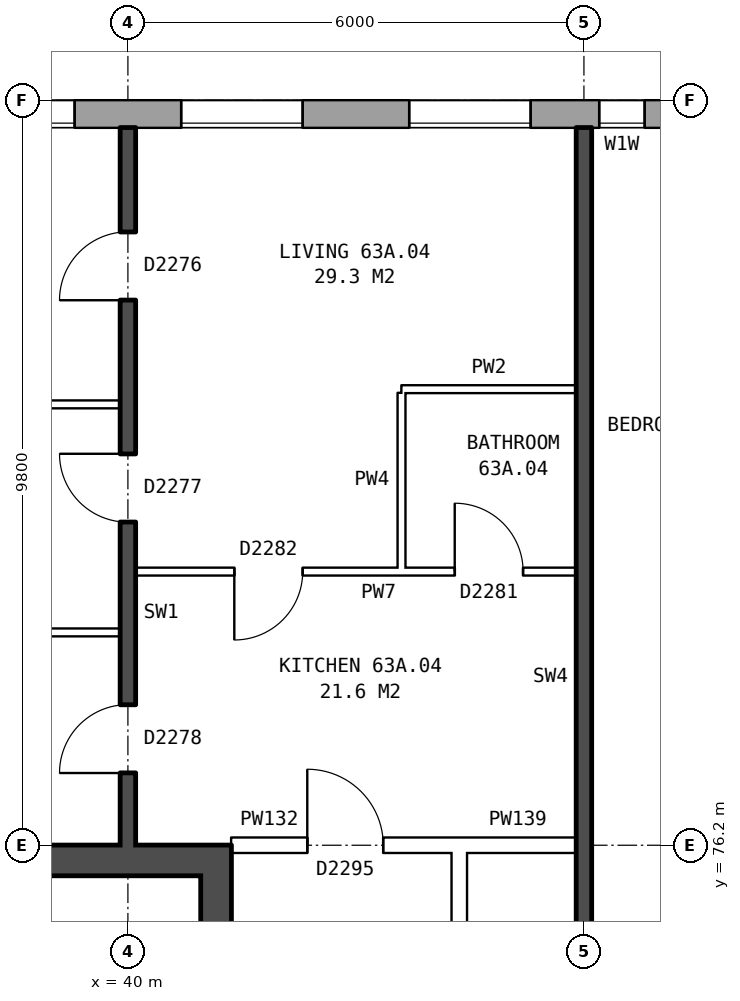
"""IFC4 building model, lengths in metres.
Left out: names, types, materials, properties, quantities, classifications, styles, units other than length and angle.
Written with IfcOpenShell. Run it as: python <this file> out.ifc"""

import sys

from ifc_helpers import new_model, si_unit, direction, frame, frame_2d, origin, place, context, subcontext, project, spatial, rectangle, extrude, element, fill, save


model = new_model("IFC4")
c1 = context("Model", 3, precision=1e-05, world=origin(), true_north=direction((0.0, 1.0)))
c2 = subcontext(c1, "Body", "Model", "MODEL_VIEW")
j1 = project(units=[si_unit("LENGTHUNIT", "METRE"), si_unit("PLANEANGLEUNIT", "RADIAN")], contexts=[c1])
p1 = place(None, origin())
s1 = spatial("IfcSite", under=j1, at=p1, CompositionType="ELEMENT")
p2 = place(p1, origin())
s2 = spatial("IfcBuilding", under=s1, at=p2, CompositionType="ELEMENT")
p3 = place(p2, frame((0.0, 0.0, 224.5)))
s3 = spatial("IfcBuildingStorey", under=s2, at=p3, CompositionType="ELEMENT", Elevation=224.5)
p4 = place(p3, frame((74.95, 85.82, 0.0), z_axis=(0.0, 0.0, 1.0), x_axis=(-1.0, 0.0, 0.0)))
e1 = element("IfcWall", 1, at=p4, inside=s3, PredefinedType="STANDARD", context=c2, shape_type="SweptSolid", body=[
    extrude(rectangle(XDim=39.875, YDim=0.36, at=frame_2d((19.938, 0.0))), origin(), (0.0, 0.0, 1.0), 2.85),
])
p5 = place(p4, frame((2.65, 0.0, 0.8)))
e2 = element("IfcOpeningElement", 2, at=p5, cuts=e1, PredefinedType="OPENING", context=c2, shape_type="SweptSolid", body=[
    extrude(rectangle(XDim=1.6, YDim=1.8, at=frame_2d((0.8, 0.9))), frame((0.0, 0.19, 0.0), z_axis=(0.0, -1.0, 0.0), x_axis=(1.0, 0.0, 0.0)), (0.0, 0.0, 1.0), 0.38),
])
p6 = place(p4, frame((5.65, 0.0, 0.8)))
e3 = element("IfcOpeningElement", 3, at=p6, cuts=e1, PredefinedType="OPENING", context=c2, shape_type="SweptSolid", body=[
    extrude(rectangle(XDim=1.6, YDim=1.8, at=frame_2d((0.8, 0.9))), frame((0.0, 0.19, 0.0), z_axis=(0.0, -1.0, 0.0), x_axis=(1.0, 0.0, 0.0)), (0.0, 0.0, 1.0), 0.38),
])
p7 = place(p4, frame((8.65, 0.0, 0.8)))
e4 = element("IfcOpeningElement", 4, at=p7, cuts=e1, PredefinedType="OPENING", context=c2, shape_type="SweptSolid", body=[
    extrude(rectangle(XDim=1.6, YDim=1.8, at=frame_2d((0.8, 0.9))), frame((0.0, 0.19, 0.0), z_axis=(0.0, -1.0, 0.0), x_axis=(1.0, 0.0, 0.0)), (0.0, 0.0, 1.0), 0.38),
])
p8 = place(p4, frame((11.65, 0.0, 0.8)))
e5 = element("IfcOpeningElement", 5, at=p8, cuts=e1, PredefinedType="OPENING", context=c2, shape_type="SweptSolid", body=[
    extrude(rectangle(XDim=1.6, YDim=1.8, at=frame_2d((0.8, 0.9))), frame((0.0, 0.19, 0.0), z_axis=(0.0, -1.0, 0.0), x_axis=(1.0, 0.0, 0.0)), (0.0, 0.0, 1.0), 0.38),
])
p9 = place(p4, frame((15.55, 0.0, 0.8)))
e6 = element("IfcOpeningElement", 6, at=p9, cuts=e1, PredefinedType="OPENING", context=c2, shape_type="SweptSolid", body=[
    extrude(rectangle(XDim=1.2, YDim=1.8, at=frame_2d((0.6, 0.9))), frame((0.0, 0.19, 0.0), z_axis=(0.0, -1.0, 0.0), x_axis=(1.0, 0.0, 0.0)), (0.0, 0.0, 1.0), 0.38),
])
p10 = place(p4, frame((17.65, 0.0, 0.8)))
e7 = element("IfcOpeningElement", 7, at=p10, cuts=e1, PredefinedType="OPENING", context=c2, shape_type="SweptSolid", body=[
    extrude(rectangle(XDim=1.6, YDim=1.8, at=frame_2d((0.8, 0.9))), frame((0.0, 0.19, 0.0), z_axis=(0.0, -1.0, 0.0), x_axis=(1.0, 0.0, 0.0)), (0.0, 0.0, 1.0), 0.38),
])
p11 = place(p4, frame((20.65, 0.0, 0.8)))
e8 = element("IfcOpeningElement", 8, at=p11, cuts=e1, PredefinedType="OPENING", context=c2, shape_type="SweptSolid", body=[
    extrude(rectangle(XDim=1.6, YDim=1.8, at=frame_2d((0.8, 0.9))), frame((0.0, 0.19, 0.0), z_axis=(0.0, -1.0, 0.0), x_axis=(1.0, 0.0, 0.0)), (0.0, 0.0, 1.0), 0.38),
])
p12 = place(p4, frame((23.65, 0.0, 0.8)))
e9 = element("IfcOpeningElement", 9, at=p12, cuts=e1, PredefinedType="OPENING", context=c2, shape_type="SweptSolid", body=[
    extrude(rectangle(XDim=1.6, YDim=1.8, at=frame_2d((0.8, 0.9))), frame((0.0, 0.19, 0.0), z_axis=(0.0, -1.0, 0.0), x_axis=(1.0, 0.0, 0.0)), (0.0, 0.0, 1.0), 0.38),
])
p13 = place(p4, frame((26.1, 0.0, 0.25)))
e10 = element("IfcOpeningElement", 10, at=p13, cuts=e1, PredefinedType="OPENING", context=c2, shape_type="SweptSolid", body=[
    extrude(rectangle(XDim=0.8, YDim=1.5, at=frame_2d((0.4, 0.75))), frame((0.0, 0.19, 0.0), z_axis=(0.0, -1.0, 0.0), x_axis=(1.0, 0.0, 0.0)), (0.0, 0.0, 1.0), 0.38),
])
p14 = place(p4, frame((29.65, 0.0, 0.8)))
e11 = element("IfcOpeningElement", 11, at=p14, cuts=e1, PredefinedType="OPENING", context=c2, shape_type="SweptSolid", body=[
    extrude(rectangle(XDim=1.6, YDim=1.8, at=frame_2d((0.8, 0.9))), frame((0.0, 0.19, 0.0), z_axis=(0.0, -1.0, 0.0), x_axis=(1.0, 0.0, 0.0)), (0.0, 0.0, 1.0), 0.38),
])
p15 = place(p4, frame((32.65, 0.0, 0.8)))
e12 = element("IfcOpeningElement", 12, at=p15, cuts=e1, PredefinedType="OPENING", context=c2, shape_type="SweptSolid", body=[
    extrude(rectangle(XDim=1.6, YDim=1.8, at=frame_2d((0.8, 0.9))), frame((0.0, 0.19, 0.0), z_axis=(0.0, -1.0, 0.0), x_axis=(1.0, 0.0, 0.0)), (0.0, 0.0, 1.0), 0.38),
])
p16 = place(p4, frame((35.65, 0.0, 0.8)))
e13 = element("IfcOpeningElement", 13, at=p16, cuts=e1, PredefinedType="OPENING", context=c2, shape_type="SweptSolid", body=[
    extrude(rectangle(XDim=1.6, YDim=1.8, at=frame_2d((0.8, 0.9))), frame((0.0, 0.19, 0.0), z_axis=(0.0, -1.0, 0.0), x_axis=(1.0, 0.0, 0.0)), (0.0, 0.0, 1.0), 0.38),
])
p17 = place(p4, frame((28.15, 0.0, 1.65)))
e14 = element("IfcOpeningElement", 14, at=p17, cuts=e1, PredefinedType="OPENING", context=c2, shape_type="SweptSolid", body=[
    extrude(rectangle(XDim=0.6, YDim=0.9, at=frame_2d((0.3, 0.45))), frame((0.0, 0.19, 0.0), z_axis=(0.0, -1.0, 0.0), x_axis=(1.0, 0.0, 0.0)), (0.0, 0.0, 1.0), 0.38),
])
p18 = place(p3, frame((41.16, 76.2, 0.0), z_axis=(0.0, 0.0, 1.0), x_axis=(0.0, -1.0, 0.0)))
e15 = element("IfcWall", 15, at=p18, inside=s3, PredefinedType="SHEAR", context=c2, shape_type="SweptSolid", body=[
    extrude(rectangle(XDim=12.4, YDim=0.4, at=frame_2d((6.2, 0.0))), origin(), (0.0, 0.0, 1.0), 2.85),
])
p19 = place(p18, frame((1.325, 0.0, 0.0)))
e16 = element("IfcOpeningElement", 16, at=p19, cuts=e15, PredefinedType="OPENING", context=c2, shape_type="SweptSolid", body=[
    extrude(rectangle(XDim=1.1, YDim=2.1, at=frame_2d((0.55, 1.05))), frame((0.0, 0.21, 0.0), z_axis=(0.0, -1.0, 0.0), x_axis=(1.0, 0.0, 0.0)), (0.0, 0.0, 1.0), 0.42),
])
p20 = place(p18, frame((5.925, 0.0, 0.0)))
e17 = element("IfcOpeningElement", 17, at=p20, cuts=e15, PredefinedType="OPENING", context=c2, shape_type="SweptSolid", body=[
    extrude(rectangle(XDim=0.85, YDim=2.1, at=frame_2d((0.425, 1.05))), frame((0.0, 0.21, 0.0), z_axis=(0.0, -1.0, 0.0), x_axis=(1.0, 0.0, 0.0)), (0.0, 0.0, 1.0), 0.42),
])
p21 = place(p18, frame((9.9, 0.0, 0.0)))
e18 = element("IfcOpeningElement", 18, at=p21, cuts=e15, PredefinedType="OPENING", context=c2, shape_type="SweptSolid", body=[
    extrude(rectangle(XDim=1.1, YDim=2.1, at=frame_2d((0.55, 1.05))), frame((0.0, 0.21, 0.0), z_axis=(0.0, -1.0, 0.0), x_axis=(1.0, 0.0, 0.0)), (0.0, 0.0, 1.0), 0.42),
])
p22 = place(p3, frame((40.96, 76.0, 0.0), z_axis=(0.0, 0.0, 1.0), x_axis=(-1.0, 0.0, 0.0)))
e19 = element("IfcWall", 19, at=p22, inside=s3, PredefinedType="SHEAR", context=c2, shape_type="SweptSolid", body=[
    extrude(rectangle(XDim=8.2, YDim=0.4, at=frame_2d((4.1, 0.0))), origin(), (0.0, 0.0, 1.0), 2.85),
])
p23 = place(p3, frame((44.36, 63.9, 0.0), z_axis=(0.0, 0.0, 1.0), x_axis=(0.0, 1.0, 0.0)))
e20 = element("IfcWall", 20, at=p23, inside=s3, PredefinedType="PARTITIONING", context=c2, shape_type="SweptSolid", body=[
    extrude(rectangle(XDim=12.2, YDim=0.2, at=frame_2d((6.1, 0.0))), origin(), (0.0, 0.0, 1.0), 2.85),
])
p24 = place(p23, frame((5.1, 0.0, 0.0)))
e21 = element("IfcOpeningElement", 21, at=p24, cuts=e20, PredefinedType="OPENING", context=c2, shape_type="SweptSolid", body=[
    extrude(rectangle(XDim=2.0, YDim=2.1, at=frame_2d((1.0, 1.05))), frame((0.0, 0.11, 0.0), z_axis=(0.0, -1.0, 0.0), x_axis=(1.0, 0.0, 0.0)), (0.0, 0.0, 1.0), 0.22),
])
p25 = place(p3, frame((41.36, 76.2, 0.0), z_axis=(0.0, 0.0, 1.0), x_axis=(1.0, 0.0, 0.0)))
e22 = element("IfcWall", 22, at=p25, inside=s3, PredefinedType="PARTITIONING", context=c2, shape_type="SweptSolid", body=[
    extrude(rectangle(XDim=3.0, YDim=0.2, at=frame_2d((1.5, 0.0))), origin(), (0.0, 0.0, 1.0), 2.85),
])
p26 = place(p25, frame((1.0, 0.0, 0.0)))
e23 = element("IfcOpeningElement", 23, at=p26, cuts=e22, PredefinedType="OPENING", context=c2, shape_type="SweptSolid", body=[
    extrude(rectangle(XDim=1.0, YDim=2.1, at=frame_2d((0.5, 1.05))), frame((0.0, 0.11, 0.0), z_axis=(0.0, -1.0, 0.0), x_axis=(1.0, 0.0, 0.0)), (0.0, 0.0, 1.0), 0.22),
])
p27 = place(p3, frame((44.36, 76.2, 0.0), z_axis=(0.0, 0.0, 1.0), x_axis=(1.0, 0.0, 0.0)))
e24 = element("IfcWall", 24, at=p27, inside=s3, PredefinedType="PARTITIONING", context=c2, shape_type="SweptSolid", body=[
    extrude(rectangle(XDim=1.54, YDim=0.2, at=frame_2d((0.77, 0.0))), origin(), (0.0, 0.0, 1.0), 2.85),
])
p28 = place(p3, frame((32.36, 79.0, 0.0), z_axis=(0.0, 0.0, 1.0), x_axis=(1.0, 0.0, 0.0)))
e25 = element("IfcWall", 25, at=p28, inside=s3, PredefinedType="PARTITIONING", context=c2, shape_type="SweptSolid", body=[
    extrude(rectangle(XDim=7.54, YDim=0.1, at=frame_2d((3.77, 0.0))), origin(), (0.0, 0.0, 1.0), 2.85),
])
p29 = place(p3, frame((40.1, 79.8, 0.0), z_axis=(0.0, 0.0, 1.0), x_axis=(1.0, 0.0, 0.0)))
e26 = element("IfcWall", 26, at=p29, inside=s3, PredefinedType="PARTITIONING", context=c2, shape_type="SweptSolid", body=[
    extrude(rectangle(XDim=5.8, YDim=0.1, at=frame_2d((2.9, 0.0))), origin(), (0.0, 0.0, 1.0), 2.85),
])
p30 = place(p29, frame((1.3, 0.0, 0.0)))
e27 = element("IfcOpeningElement", 27, at=p30, cuts=e26, PredefinedType="OPENING", context=c2, shape_type="SweptSolid", body=[
    extrude(rectangle(XDim=0.9, YDim=2.1, at=frame_2d((0.45, 1.05))), frame((0.0, 0.06, 0.0), z_axis=(0.0, -1.0, 0.0), x_axis=(1.0, 0.0, 0.0)), (0.0, 0.0, 1.0), 0.12),
])
p31 = place(p29, frame((4.2, 0.0, 0.0)))
e28 = element("IfcOpeningElement", 28, at=p31, cuts=e26, PredefinedType="OPENING", context=c2, shape_type="SweptSolid", body=[
    extrude(rectangle(XDim=0.9, YDim=2.1, at=frame_2d((0.45, 1.05))), frame((0.0, 0.06, 0.0), z_axis=(0.0, -1.0, 0.0), x_axis=(1.0, 0.0, 0.0)), (0.0, 0.0, 1.0), 0.12),
])
p32 = place(p3, frame((32.36, 82.0, 0.0), z_axis=(0.0, 0.0, 1.0), x_axis=(1.0, 0.0, 0.0)))
e29 = element("IfcWall", 29, at=p32, inside=s3, PredefinedType="PARTITIONING", context=c2, shape_type="SweptSolid", body=[
    extrude(rectangle(XDim=7.54, YDim=0.1, at=frame_2d((3.77, 0.0))), origin(), (0.0, 0.0, 1.0), 2.85),
])
p33 = place(p3, frame((43.6, 82.2, 0.0), z_axis=(0.0, 0.0, 1.0), x_axis=(1.0, 0.0, 0.0)))
e30 = element("IfcWall", 30, at=p33, inside=s3, PredefinedType="PARTITIONING", context=c2, shape_type="SweptSolid", body=[
    extrude(rectangle(XDim=2.3, YDim=0.1, at=frame_2d((1.15, 0.0))), origin(), (0.0, 0.0, 1.0), 2.85),
])
p34 = place(p3, frame((40.0, 76.2, 0.0), z_axis=(0.0, 0.0, 1.0), x_axis=(0.0, 1.0, 0.0)))
e31 = element("IfcWall", 31, at=p34, inside=s3, PredefinedType="SOLIDWALL", context=c2, shape_type="SweptSolid", body=[
    extrude(rectangle(XDim=9.44, YDim=0.2, at=frame_2d((4.72, 0.0))), origin(), (0.0, 0.0, 1.0), 2.85),
])
p35 = place(p34, frame((7.17, 0.0, 0.0)))
e32 = element("IfcOpeningElement", 32, at=p35, cuts=e31, PredefinedType="OPENING", context=c2, shape_type="SweptSolid", body=[
    extrude(rectangle(XDim=0.9, YDim=2.1, at=frame_2d((0.45, 1.05))), frame((0.0, 0.11, 0.0), z_axis=(0.0, -1.0, 0.0), x_axis=(1.0, 0.0, 0.0)), (0.0, 0.0, 1.0), 0.22),
])
p36 = place(p34, frame((4.25, 0.0, 0.0)))
e33 = element("IfcOpeningElement", 33, at=p36, cuts=e31, PredefinedType="OPENING", context=c2, shape_type="SweptSolid", body=[
    extrude(rectangle(XDim=0.9, YDim=2.1, at=frame_2d((0.45, 1.05))), frame((0.0, 0.11, 0.0), z_axis=(0.0, -1.0, 0.0), x_axis=(1.0, 0.0, 0.0)), (0.0, 0.0, 1.0), 0.22),
])
p37 = place(p34, frame((0.95, 0.0, 0.0)))
e34 = element("IfcOpeningElement", 34, at=p37, cuts=e31, PredefinedType="OPENING", context=c2, shape_type="SweptSolid", body=[
    extrude(rectangle(XDim=0.9, YDim=2.1, at=frame_2d((0.45, 1.05))), frame((0.0, 0.11, 0.0), z_axis=(0.0, -1.0, 0.0), x_axis=(1.0, 0.0, 0.0)), (0.0, 0.0, 1.0), 0.22),
])
p38 = place(p3, frame((43.6, 79.85, 0.0), z_axis=(0.0, 0.0, 1.0), x_axis=(0.0, 1.0, 0.0)))
e35 = element("IfcWall", 35, at=p38, inside=s3, PredefinedType="PARTITIONING", context=c2, shape_type="SweptSolid", body=[
    extrude(rectangle(XDim=2.3, YDim=0.1, at=frame_2d((1.15, 0.0))), origin(), (0.0, 0.0, 1.0), 2.85),
])
p39 = place(p3, frame((46.0, 71.2, 0.0), z_axis=(0.0, 0.0, 1.0), x_axis=(0.0, 1.0, 0.0)))
e36 = element("IfcWall", 36, at=p39, inside=s3, PredefinedType="SOLIDWALL", context=c2, shape_type="SweptSolid", body=[
    extrude(rectangle(XDim=14.44, YDim=0.2, at=frame_2d((7.22, 0.0))), origin(), (0.0, 0.0, 1.0), 2.85),
])
p40 = place(p14, origin())
e37 = element("IfcWindow", 37, at=p40, inside=s3, PartitioningType="SINGLE_PANEL", PredefinedType="WINDOW", context=c2, shape_type="SweptSolid", body=[
    extrude(rectangle(XDim=1.6, YDim=1.8, at=frame_2d((0.8, 0.9))), frame((0.0, 0.15, 0.0), z_axis=(0.0, -1.0, 0.0), x_axis=(1.0, 0.0, 0.0)), (0.0, 0.0, 1.0), 0.06),
])
fill(e11, e37)
p41 = place(p15, origin())
e38 = element("IfcWindow", 38, at=p41, inside=s3, PartitioningType="SINGLE_PANEL", PredefinedType="WINDOW", context=c2, shape_type="SweptSolid", body=[
    extrude(rectangle(XDim=1.6, YDim=1.8, at=frame_2d((0.8, 0.9))), frame((0.0, 0.15, 0.0), z_axis=(0.0, -1.0, 0.0), x_axis=(1.0, 0.0, 0.0)), (0.0, 0.0, 1.0), 0.06),
])
fill(e12, e38)
p42 = place(p16, origin())
e39 = element("IfcWindow", 39, at=p42, inside=s3, PartitioningType="SINGLE_PANEL", PredefinedType="WINDOW", context=c2, shape_type="SweptSolid", body=[
    extrude(rectangle(XDim=1.6, YDim=1.8, at=frame_2d((0.8, 0.9))), frame((0.0, 0.15, 0.0), z_axis=(0.0, -1.0, 0.0), x_axis=(1.0, 0.0, 0.0)), (0.0, 0.0, 1.0), 0.06),
])
fill(e13, e39)
p43 = place(p35, origin())
e40 = element("IfcDoor", 40, at=p43, inside=s3, OperationType="SINGLE_SWING_LEFT", PredefinedType="DOOR", context=c2, shape_type="SweptSolid", body=[
    extrude(rectangle(XDim=0.9, YDim=2.1, at=frame_2d((0.45, 1.05))), frame((0.0, 0.025, 0.0), z_axis=(0.0, -1.0, 0.0), x_axis=(1.0, 0.0, 0.0)), (0.0, 0.0, 1.0), 0.05),
])
fill(e32, e40)
p44 = place(p36, origin())
e41 = element("IfcDoor", 41, at=p44, inside=s3, OperationType="SINGLE_SWING_RIGHT", PredefinedType="DOOR", context=c2, shape_type="SweptSolid", body=[
    extrude(rectangle(XDim=0.9, YDim=2.1, at=frame_2d((0.45, 1.05))), frame((0.0, 0.025, 0.0), z_axis=(0.0, -1.0, 0.0), x_axis=(1.0, 0.0, 0.0)), (0.0, 0.0, 1.0), 0.05),
])
fill(e33, e41)
p45 = place(p37, origin())
e42 = element("IfcDoor", 42, at=p45, inside=s3, OperationType="SINGLE_SWING_LEFT", PredefinedType="DOOR", context=c2, shape_type="SweptSolid", body=[
    extrude(rectangle(XDim=0.9, YDim=2.1, at=frame_2d((0.45, 1.05))), frame((0.0, 0.025, 0.0), z_axis=(0.0, -1.0, 0.0), x_axis=(1.0, 0.0, 0.0)), (0.0, 0.0, 1.0), 0.05),
])
fill(e34, e42)
p46 = place(p26, origin())
e43 = element("IfcDoor", 43, at=p46, inside=s3, OperationType="SINGLE_SWING_LEFT", PredefinedType="DOOR", context=c2, shape_type="SweptSolid", body=[
    extrude(rectangle(XDim=1.0, YDim=2.1, at=frame_2d((0.5, 1.05))), frame((0.0, 0.025, 0.0), z_axis=(0.0, -1.0, 0.0), x_axis=(1.0, 0.0, 0.0)), (0.0, 0.0, 1.0), 0.05),
])
fill(e23, e43)
p47 = place(p30, frame((0.9, 0.0, 0.0), z_axis=(0.0, 0.0, 1.0), x_axis=(-1.0, 0.0, 0.0)))
e44 = element("IfcDoor", 44, at=p47, inside=s3, OperationType="SINGLE_SWING_RIGHT", PredefinedType="DOOR", context=c2, shape_type="SweptSolid", body=[
    extrude(rectangle(XDim=0.9, YDim=2.1, at=frame_2d((0.45, 1.05))), frame((0.0, 0.025, 0.0), z_axis=(0.0, -1.0, 0.0), x_axis=(1.0, 0.0, 0.0)), (0.0, 0.0, 1.0), 0.05),
])
fill(e27, e44)
p48 = place(p31, origin())
e45 = element("IfcDoor", 45, at=p48, inside=s3, OperationType="SINGLE_SWING_LEFT", PredefinedType="DOOR", context=c2, shape_type="SweptSolid", body=[
    extrude(rectangle(XDim=0.9, YDim=2.1, at=frame_2d((0.45, 1.05))), frame((0.0, 0.025, 0.0), z_axis=(0.0, -1.0, 0.0), x_axis=(1.0, 0.0, 0.0)), (0.0, 0.0, 1.0), 0.05),
])
fill(e28, e45)
p49 = place(p17, origin())
e46 = element("IfcWindow", 46, at=p49, inside=s3, PartitioningType="SINGLE_PANEL", PredefinedType="WINDOW", context=c2, shape_type="SweptSolid", body=[
    extrude(rectangle(XDim=0.6, YDim=0.9, at=frame_2d((0.3, 0.45))), frame((0.0, 0.15, 0.0), z_axis=(0.0, -1.0, 0.0), x_axis=(1.0, 0.0, 0.0)), (0.0, 0.0, 1.0), 0.06),
])
fill(e14, e46)
save(model, sys.argv[1])
